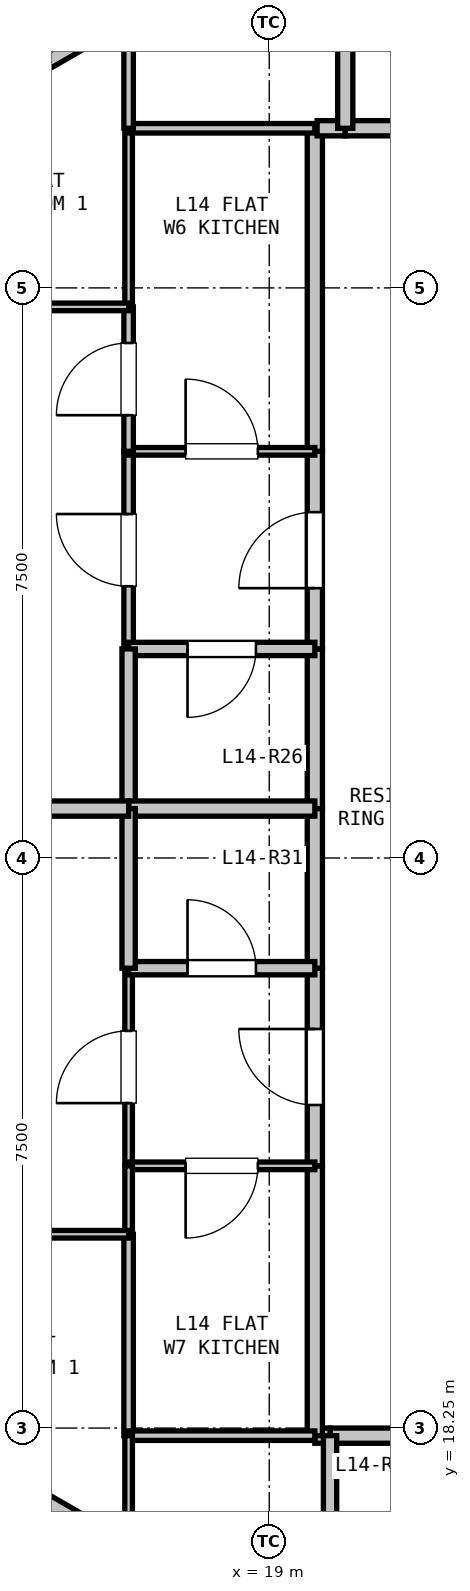
"""IFC4 building model, lengths in metres.
Left out: names, types, materials, properties, quantities, classifications, styles, units other than length and angle.
Written with IfcOpenShell. Run it as: python <this file> out.ifc"""

import sys

from ifc_helpers import new_model, si_unit, direction, frame, frame_2d, origin, place, context, subcontext, project, spatial, rectangle, extrude, element, fill, save


model = new_model("IFC4")
c1 = context("Model", 3, precision=1e-05, world=origin(), true_north=direction((0.0, 1.0)))
c2 = subcontext(c1, "Body", "Model", "MODEL_VIEW")
j1 = project(units=[si_unit("LENGTHUNIT", "METRE"), si_unit("PLANEANGLEUNIT", "RADIAN")], contexts=[c1])
p1 = place(None, origin())
s1 = spatial("IfcSite", under=j1, at=p1, CompositionType="ELEMENT")
p2 = place(p1, origin())
s2 = spatial("IfcBuilding", under=s1, at=p2, CompositionType="ELEMENT")
p3 = place(p2, frame((0.0, 0.0, 52.2)))
s3 = spatial("IfcBuildingStorey", under=s2, at=p3, CompositionType="ELEMENT", Elevation=52.2)
for number, where, z_axis, x_axis in (
    (1, (15.008, 35.611, 0.0), (0.0, 0.0, 1.0), (0.866, 0.5, 0.0)),
    (2, (16.48, 17.039, 0.0), (0.0, 0.0, 1.0), (-0.866, 0.5, 0.0)),
):
    element("IfcWall", number, at=place(p3, frame(where, z_axis=z_axis, x_axis=x_axis)), inside=s3, PredefinedType="PARAPET", context=c2, shape_type="SweptSolid", body=[
        extrude(rectangle(XDim=1.7, YDim=0.2, at=frame_2d((0.85, 0.0))), origin(), (0.0, 0.0, 1.0), 2.66),
    ])
p4 = place(p3, frame((21.8, 18.15, 0.0), z_axis=(0.0, 0.0, 1.0), x_axis=(-1.0, 0.0, 0.0)))
e3 = element("IfcWall", 3, at=p4, inside=s3, PredefinedType="PARTITIONING", context=c2, shape_type="SweptSolid", body=[
    extrude(rectangle(XDim=2.0, YDim=0.2, at=frame_2d((1.0, 0.0))), origin(), (0.0, 0.0, 1.0), 3.04),
])
p5 = place(p3, frame((19.8, 18.15, 0.0), z_axis=(0.0, 0.0, 1.0), x_axis=(-1.0, 0.0, 0.0)))
e4 = element("IfcWall", 4, at=p5, inside=s3, PredefinedType="PARTITIONING", context=c2, shape_type="SweptSolid", body=[
    extrude(rectangle(XDim=0.2, YDim=0.2, at=frame_2d((0.1, 0.0))), origin(), (0.0, 0.0, 1.0), 3.04),
])
p6 = place(p3, frame((19.6, 18.15, 0.0), z_axis=(0.0, 0.0, 1.0), x_axis=(0.0, 1.0, 0.0)))
e5 = element("IfcWall", 5, at=p6, inside=s3, PredefinedType="PARTITIONING", context=c2, shape_type="SweptSolid", body=[
    extrude(rectangle(XDim=3.55, YDim=0.2, at=frame_2d((1.775, 0.0))), origin(), (0.0, 0.0, 1.0), 2.338),
])
p7 = place(p3, frame((19.6, 21.7, 0.0), z_axis=(0.0, 0.0, 1.0), x_axis=(0.0, 1.0, 0.0)))
e6 = element("IfcWall", 6, at=p7, inside=s3, PredefinedType="PARTITIONING", context=c2, shape_type="SweptSolid", body=[
    extrude(rectangle(XDim=2.6, YDim=0.2, at=frame_2d((1.3, 0.0))), origin(), (0.0, 0.0, 1.0), 3.04),
])
p8 = place(p7, frame((0.8, 0.0, 0.0)))
e7 = element("IfcOpeningElement", 7, at=p8, cuts=e6, PredefinedType="OPENING", context=c2, shape_type="SweptSolid", body=[
    extrude(rectangle(XDim=1.0, YDim=2.15, at=frame_2d((0.5, 1.075))), frame((0.0, 0.11, 0.0), z_axis=(0.0, -1.0, 0.0), x_axis=(1.0, 0.0, 0.0)), (0.0, 0.0, 1.0), 0.22),
])
p9 = place(p3, frame((19.6, 24.3, 0.0), z_axis=(0.0, 0.0, 1.0), x_axis=(0.0, 1.0, 0.0)))
e8 = element("IfcWall", 8, at=p9, inside=s3, PredefinedType="PARTITIONING", context=c2, shape_type="SweptSolid", body=[
    extrude(rectangle(XDim=2.1, YDim=0.2, at=frame_2d((1.05, 0.0))), origin(), (0.0, 0.0, 1.0), 3.04),
])
p10 = place(p3, frame((19.6, 26.4, 0.0), z_axis=(0.0, 0.0, 1.0), x_axis=(0.0, 1.0, 0.0)))
e9 = element("IfcWall", 9, at=p10, inside=s3, PredefinedType="PARTITIONING", context=c2, shape_type="SweptSolid", body=[
    extrude(rectangle(XDim=2.1, YDim=0.2, at=frame_2d((1.05, 0.0))), origin(), (0.0, 0.0, 1.0), 3.04),
])
p11 = place(p3, frame((19.6, 28.5, 0.0), z_axis=(0.0, 0.0, 1.0), x_axis=(0.0, 1.0, 0.0)))
e10 = element("IfcWall", 10, at=p11, inside=s3, PredefinedType="PARTITIONING", context=c2, shape_type="SweptSolid", body=[
    extrude(rectangle(XDim=2.6, YDim=0.2, at=frame_2d((1.3, 0.0))), origin(), (0.0, 0.0, 1.0), 3.04),
])
p12 = place(p11, frame((0.8, 0.0, 0.0)))
e11 = element("IfcOpeningElement", 11, at=p12, cuts=e10, PredefinedType="OPENING", context=c2, shape_type="SweptSolid", body=[
    extrude(rectangle(XDim=1.0, YDim=2.15, at=frame_2d((0.5, 1.075))), frame((0.0, 0.11, 0.0), z_axis=(0.0, -1.0, 0.0), x_axis=(1.0, 0.0, 0.0)), (0.0, 0.0, 1.0), 0.22),
])
p13 = place(p3, frame((19.6, 31.1, 0.0), z_axis=(0.0, 0.0, 1.0), x_axis=(0.0, 1.0, 0.0)))
e12 = element("IfcWall", 12, at=p13, inside=s3, PredefinedType="PARTITIONING", context=c2, shape_type="SweptSolid", body=[
    extrude(rectangle(XDim=4.25, YDim=0.2, at=frame_2d((2.125, 0.0))), origin(), (0.0, 0.0, 1.0), 2.338),
])
p14 = place(p3, frame((19.63, 35.35, 0.0), z_axis=(0.0, 0.0, 1.0), x_axis=(1.0, 0.0, 0.0)))
e13 = element("IfcWall", 13, at=p14, inside=s3, PredefinedType="PARTITIONING", context=c2, shape_type="SweptSolid", body=[
    extrude(rectangle(XDim=0.37, YDim=0.2, at=frame_2d((0.185, 0.0))), origin(), (0.0, 0.0, 1.0), 3.04),
])
p15 = place(p3, frame((20.0, 35.35, 0.0), z_axis=(0.0, 0.0, 1.0), x_axis=(1.0, 0.0, 0.0)))
e14 = element("IfcWall", 14, at=p15, inside=s3, PredefinedType="PARTITIONING", context=c2, shape_type="SweptSolid", body=[
    extrude(rectangle(XDim=2.3, YDim=0.2, at=frame_2d((1.15, 0.0))), origin(), (0.0, 0.0, 1.0), 3.04),
])
p16 = place(p15, frame((0.725, 0.0, 0.0)))
e15 = element("IfcOpeningElement", 15, at=p16, cuts=e14, PredefinedType="OPENING", context=c2, shape_type="SweptSolid", body=[
    extrude(rectangle(XDim=0.85, YDim=2.1, at=frame_2d((0.425, 1.05))), frame((0.0, 0.11, 0.0), z_axis=(0.0, -1.0, 0.0), x_axis=(1.0, 0.0, 0.0)), (0.0, 0.0, 1.0), 0.22),
])
p17 = place(p3, frame((17.15, 28.5, 0.0), z_axis=(0.0, 0.0, 1.0), x_axis=(0.0, 1.0, 0.0)))
e16 = element("IfcWall", 16, at=p17, inside=s3, PredefinedType="PARTITIONING", context=c2, shape_type="SweptSolid", body=[
    extrude(rectangle(XDim=2.6, YDim=0.125, at=frame_2d((1.3, 0.0))), origin(), (0.0, 0.0, 1.0), 3.04),
])
p18 = place(p17, frame((0.825, 0.0, 0.0)))
e17 = element("IfcOpeningElement", 17, at=p18, cuts=e16, PredefinedType="OPENING", context=c2, shape_type="SweptSolid", body=[
    extrude(rectangle(XDim=0.95, YDim=2.1, at=frame_2d((0.475, 1.05))), frame((0.0, 0.073, 0.0), z_axis=(0.0, -1.0, 0.0), x_axis=(1.0, 0.0, 0.0)), (0.0, 0.0, 1.0), 0.145),
])
p19 = place(p3, frame((17.15, 31.1, 0.0), z_axis=(0.0, 0.0, 1.0), x_axis=(1.0, 0.0, 0.0)))
e18 = element("IfcWall", 18, at=p19, inside=s3, PredefinedType="PARTITIONING", context=c2, shape_type="SweptSolid", body=[
    extrude(rectangle(XDim=2.45, YDim=0.1, at=frame_2d((1.225, 0.0))), origin(), (0.0, 0.0, 1.0), 3.04),
])
p20 = place(p19, frame((0.75, 0.0, 0.0)))
e19 = element("IfcOpeningElement", 19, at=p20, cuts=e18, PredefinedType="OPENING", context=c2, shape_type="SweptSolid", body=[
    extrude(rectangle(XDim=0.95, YDim=2.1, at=frame_2d((0.475, 1.05))), frame((0.0, 0.06, 0.0), z_axis=(0.0, -1.0, 0.0), x_axis=(1.0, 0.0, 0.0)), (0.0, 0.0, 1.0), 0.12),
])
p21 = place(p3, frame((19.6, 28.5, 0.0), z_axis=(0.0, 0.0, 1.0), x_axis=(-1.0, 0.0, 0.0)))
e20 = element("IfcWall", 20, at=p21, inside=s3, PredefinedType="PLUMBINGWALL", context=c2, shape_type="SweptSolid", body=[
    extrude(rectangle(XDim=2.45, YDim=0.175, at=frame_2d((1.225, 0.0))), origin(), (0.0, 0.0, 1.0), 3.04),
])
p22 = place(p21, frame((0.775, 0.0, 0.0)))
e21 = element("IfcOpeningElement", 21, at=p22, cuts=e20, PredefinedType="OPENING", context=c2, shape_type="SweptSolid", body=[
    extrude(rectangle(XDim=0.9, YDim=2.1, at=frame_2d((0.45, 1.05))), frame((0.0, 0.097, 0.0), z_axis=(0.0, -1.0, 0.0), x_axis=(1.0, 0.0, 0.0)), (0.0, 0.0, 1.0), 0.195),
])
p23 = place(p3, frame((17.15, 21.7, 0.0), z_axis=(0.0, 0.0, 1.0), x_axis=(0.0, 1.0, 0.0)))
e22 = element("IfcWall", 22, at=p23, inside=s3, PredefinedType="PARTITIONING", context=c2, shape_type="SweptSolid", body=[
    extrude(rectangle(XDim=2.6, YDim=0.1, at=frame_2d((1.3, 0.0))), origin(), (0.0, 0.0, 1.0), 3.04),
])
p24 = place(p23, frame((0.825, 0.0, 0.0)))
e23 = element("IfcOpeningElement", 23, at=p24, cuts=e22, PredefinedType="OPENING", context=c2, shape_type="SweptSolid", body=[
    extrude(rectangle(XDim=0.95, YDim=2.1, at=frame_2d((0.475, 1.05))), frame((0.0, 0.06, 0.0), z_axis=(0.0, -1.0, 0.0), x_axis=(1.0, 0.0, 0.0)), (0.0, 0.0, 1.0), 0.12),
])
p25 = place(p3, frame((17.15, 24.3, 0.0), z_axis=(0.0, 0.0, 1.0), x_axis=(1.0, 0.0, 0.0)))
e24 = element("IfcWall", 24, at=p25, inside=s3, PredefinedType="PLUMBINGWALL", context=c2, shape_type="SweptSolid", body=[
    extrude(rectangle(XDim=2.45, YDim=0.175, at=frame_2d((1.225, 0.0))), origin(), (0.0, 0.0, 1.0), 3.04),
])
p26 = place(p25, frame((0.775, 0.0, 0.0)))
e25 = element("IfcOpeningElement", 25, at=p26, cuts=e24, PredefinedType="OPENING", context=c2, shape_type="SweptSolid", body=[
    extrude(rectangle(XDim=0.9, YDim=2.1, at=frame_2d((0.45, 1.05))), frame((0.0, 0.097, 0.0), z_axis=(0.0, -1.0, 0.0), x_axis=(1.0, 0.0, 0.0)), (0.0, 0.0, 1.0), 0.195),
])
p27 = place(p3, frame((19.6, 21.7, 0.0), z_axis=(0.0, 0.0, 1.0), x_axis=(-1.0, 0.0, 0.0)))
e26 = element("IfcWall", 26, at=p27, inside=s3, PredefinedType="PARTITIONING", context=c2, shape_type="SweptSolid", body=[
    extrude(rectangle(XDim=2.45, YDim=0.1, at=frame_2d((1.225, 0.0))), origin(), (0.0, 0.0, 1.0), 2.338),
])
p28 = place(p27, frame((0.75, 0.0, 0.0)))
e27 = element("IfcOpeningElement", 27, at=p28, cuts=e26, PredefinedType="OPENING", context=c2, shape_type="SweptSolid", body=[
    extrude(rectangle(XDim=0.95, YDim=2.1, at=frame_2d((0.475, 1.05))), frame((0.0, 0.06, 0.0), z_axis=(0.0, -1.0, 0.0), x_axis=(1.0, 0.0, 0.0)), (0.0, 0.0, 1.0), 0.12),
])
p29 = place(p3, frame((19.8, 14.956, 0.0), z_axis=(0.0, 0.0, 1.0), x_axis=(0.0, 1.0, 0.0)))
e28 = element("IfcWall", 28, at=p29, inside=s3, PredefinedType="PLUMBINGWALL", context=c2, shape_type="SweptSolid", body=[
    extrude(rectangle(XDim=3.194, YDim=0.175, at=frame_2d((1.597, 0.0))), origin(), (0.0, 0.0, 1.0), 2.365),
])
p30 = place(p3, frame((17.15, 26.4, 0.0), z_axis=(0.0, 0.0, 1.0), x_axis=(0.0, 1.0, 0.0)))
e29 = element("IfcWall", 29, at=p30, inside=s3, PredefinedType="PLUMBINGWALL", context=c2, shape_type="SweptSolid", body=[
    extrude(rectangle(XDim=2.1, YDim=0.175, at=frame_2d((1.05, 0.0))), origin(), (0.0, 0.0, 1.0), 3.04),
])
p31 = place(p3, frame((19.6, 26.4, 0.0), z_axis=(0.0, 0.0, 1.0), x_axis=(-1.0, 0.0, 0.0)))
e30 = element("IfcWall", 30, at=p31, inside=s3, PredefinedType="PARTITIONING", context=c2, shape_type="SweptSolid", body=[
    extrude(rectangle(XDim=2.45, YDim=0.2, at=frame_2d((1.225, 0.0))), origin(), (0.0, 0.0, 1.0), 3.04),
])
p32 = place(p3, frame((17.15, 31.1, 0.0), z_axis=(0.0, 0.0, 1.0), x_axis=(0.0, 1.0, 0.0)))
e31 = element("IfcWall", 31, at=p32, inside=s3, PredefinedType="PARTITIONING", context=c2, shape_type="SweptSolid", body=[
    extrude(rectangle(XDim=1.9, YDim=0.125, at=frame_2d((0.95, 0.0))), origin(), (0.0, 0.0, 1.0), 2.338),
])
p33 = place(p32, frame((0.475, 0.0, 0.0)))
e32 = element("IfcOpeningElement", 32, at=p33, cuts=e31, PredefinedType="OPENING", context=c2, shape_type="SweptSolid", body=[
    extrude(rectangle(XDim=0.95, YDim=2.1, at=frame_2d((0.475, 1.05))), frame((0.0, 0.073, 0.0), z_axis=(0.0, -1.0, 0.0), x_axis=(1.0, 0.0, 0.0)), (0.0, 0.0, 1.0), 0.145),
])
p34 = place(p3, frame((17.15, 33.0, 0.0), z_axis=(0.0, 0.0, 1.0), x_axis=(0.0, 1.0, 0.0)))
e33 = element("IfcWall", 33, at=p34, inside=s3, PredefinedType="PARTITIONING", context=c2, shape_type="SweptSolid", body=[
    extrude(rectangle(XDim=2.35, YDim=0.1, at=frame_2d((1.175, 0.0))), origin(), (0.0, 0.0, 1.0), 3.04),
])
p35 = place(p3, frame((17.15, 35.35, 0.0), z_axis=(0.0, 0.0, 1.0), x_axis=(1.0, 0.0, 0.0)))
e34 = element("IfcWall", 34, at=p35, inside=s3, PredefinedType="PARTITIONING", context=c2, shape_type="SweptSolid", body=[
    extrude(rectangle(XDim=2.45, YDim=0.125, at=frame_2d((1.225, 0.0))), origin(), (0.0, 0.0, 1.0), 3.04),
])
p36 = place(p3, frame((17.15, 24.3, 0.0), z_axis=(0.0, 0.0, 1.0), x_axis=(0.0, 1.0, 0.0)))
e35 = element("IfcWall", 35, at=p36, inside=s3, PredefinedType="PLUMBINGWALL", context=c2, shape_type="SweptSolid", body=[
    extrude(rectangle(XDim=2.1, YDim=0.175, at=frame_2d((1.05, 0.0))), origin(), (0.0, 0.0, 1.0), 3.04),
])
p37 = place(p3, frame((17.15, 18.15, 0.0), z_axis=(0.0, 0.0, 1.0), x_axis=(0.0, 1.0, 0.0)))
e36 = element("IfcWall", 36, at=p37, inside=s3, PredefinedType="PARTITIONING", context=c2, shape_type="SweptSolid", body=[
    extrude(rectangle(XDim=2.65, YDim=0.125, at=frame_2d((1.325, 0.0))), origin(), (0.0, 0.0, 1.0), 3.04),
])
p38 = place(p3, frame((17.15, 20.8, 0.0), z_axis=(0.0, 0.0, 1.0), x_axis=(0.0, 1.0, 0.0)))
e37 = element("IfcWall", 37, at=p38, inside=s3, PredefinedType="PARTITIONING", context=c2, shape_type="SweptSolid", body=[
    extrude(rectangle(XDim=0.9, YDim=0.1, at=frame_2d((0.45, 0.0))), origin(), (0.0, 0.0, 1.0), 2.338),
])
p39 = place(p3, frame((19.6, 18.15, 0.0), z_axis=(0.0, 0.0, 1.0), x_axis=(-1.0, 0.0, 0.0)))
e38 = element("IfcWall", 38, at=p39, inside=s3, PredefinedType="PARTITIONING", context=c2, shape_type="SweptSolid", body=[
    extrude(rectangle(XDim=2.45, YDim=0.125, at=frame_2d((1.225, 0.0))), origin(), (0.0, 0.0, 1.0), 3.04),
])
p40 = place(p3, frame((20.0, 35.35, 0.0), z_axis=(0.0, 0.0, 1.0), x_axis=(0.0, 1.0, 0.0)))
e39 = element("IfcWall", 39, at=p40, inside=s3, PredefinedType="PARTITIONING", context=c2, shape_type="SweptSolid", body=[
    extrude(rectangle(XDim=3.31, YDim=0.2, at=frame_2d((1.655, 0.0))), origin(), (0.0, 0.0, 1.0), 2.365),
])
p41 = place(p3, frame((10.419, 33.0, 0.0), z_axis=(0.0, 0.0, 1.0), x_axis=(1.0, 0.0, 0.0)))
e40 = element("IfcWall", 40, at=p41, inside=s3, PredefinedType="PARTITIONING", context=c2, shape_type="SweptSolid", body=[
    extrude(rectangle(XDim=6.731, YDim=0.1, at=frame_2d((3.365, 0.0))), origin(), (0.0, 0.0, 1.0), 2.365),
])
p42 = place(p41, frame((2.89, 0.0, 0.0)))
e41 = element("IfcOpeningElement", 41, at=p42, cuts=e40, PredefinedType="OPENING", context=c2, shape_type="SweptSolid", body=[
    extrude(rectangle(XDim=0.95, YDim=2.1, at=frame_2d((0.475, 1.05))), frame((0.0, 0.06, 0.0), z_axis=(0.0, -1.0, 0.0), x_axis=(1.0, 0.0, 0.0)), (0.0, 0.0, 1.0), 0.12),
])
p43 = place(p3, frame((17.15, 26.4, 0.0), z_axis=(0.0, 0.0, 1.0), x_axis=(-1.0, 0.0, 0.0)))
e42 = element("IfcWall", 42, at=p43, inside=s3, PredefinedType="PARTITIONING", context=c2, shape_type="SweptSolid", body=[
    extrude(rectangle(XDim=13.175, YDim=0.2, at=frame_2d((6.588, 0.0))), origin(), (0.0, 0.0, 1.0), 2.65),
])
p44 = place(p3, frame((17.15, 37.014, 0.0), z_axis=(0.0, 0.0, 1.0), x_axis=(0.0, -1.0, 0.0)))
e43 = element("IfcWall", 43, at=p44, inside=s3, PredefinedType="PARTITIONING", context=c2, shape_type="SweptSolid", body=[
    extrude(rectangle(XDim=1.664, YDim=0.125, at=frame_2d((0.832, 0.0))), origin(), (0.0, 0.0, 1.0), 2.365),
])
p45 = place(p3, frame((17.15, 20.8, 0.0), z_axis=(0.0, 0.0, 1.0), x_axis=(-1.0, 0.0, 0.0)))
e44 = element("IfcWall", 44, at=p45, inside=s3, PredefinedType="PARTITIONING", context=c2, shape_type="SweptSolid", body=[
    extrude(rectangle(XDim=7.25, YDim=0.1, at=frame_2d((3.625, 0.0))), origin(), (0.0, 0.0, 1.0), 2.365),
])
p46 = place(p45, frame((3.15, 0.0, 0.0)))
e45 = element("IfcOpeningElement", 45, at=p46, cuts=e44, PredefinedType="OPENING", context=c2, shape_type="SweptSolid", body=[
    extrude(rectangle(XDim=0.95, YDim=2.1, at=frame_2d((0.475, 1.05))), frame((0.0, 0.06, 0.0), z_axis=(0.0, -1.0, 0.0), x_axis=(1.0, 0.0, 0.0)), (0.0, 0.0, 1.0), 0.12),
])
p47 = place(p3, frame((17.15, 18.15, 0.0), z_axis=(0.0, 0.0, 1.0), x_axis=(0.0, -1.0, 0.0)))
e46 = element("IfcWall", 46, at=p47, inside=s3, PredefinedType="PARTITIONING", context=c2, shape_type="SweptSolid", body=[
    extrude(rectangle(XDim=1.664, YDim=0.1, at=frame_2d((0.832, 0.0))), origin(), (0.0, 0.0, 1.0), 2.365),
])
p48 = place(p12, origin())
e47 = element("IfcDoor", 47, at=p48, inside=s3, OperationType="SINGLE_SWING_LEFT", PredefinedType="DOOR", context=c2, shape_type="SweptSolid", body=[
    extrude(rectangle(XDim=1.0, YDim=2.15, at=frame_2d((0.5, 1.075))), frame((0.0, 0.025, 0.0), z_axis=(0.0, -1.0, 0.0), x_axis=(1.0, 0.0, 0.0)), (0.0, 0.0, 1.0), 0.05),
])
fill(e11, e47)
p49 = place(p8, origin())
e48 = element("IfcDoor", 48, at=p49, inside=s3, OperationType="SINGLE_SWING_RIGHT", PredefinedType="DOOR", context=c2, shape_type="SweptSolid", body=[
    extrude(rectangle(XDim=1.0, YDim=2.15, at=frame_2d((0.5, 1.075))), frame((0.0, 0.025, 0.0), z_axis=(0.0, -1.0, 0.0), x_axis=(1.0, 0.0, 0.0)), (0.0, 0.0, 1.0), 0.05),
])
fill(e7, e48)
p50 = place(p22, origin())
e49 = element("IfcDoor", 49, at=p50, inside=s3, OperationType="SINGLE_SWING_RIGHT", PredefinedType="DOOR", context=c2, shape_type="SweptSolid", body=[
    extrude(rectangle(XDim=0.9, YDim=2.1, at=frame_2d((0.45, 1.05))), frame((0.0, 0.025, 0.0), z_axis=(0.0, -1.0, 0.0), x_axis=(1.0, 0.0, 0.0)), (0.0, 0.0, 1.0), 0.05),
])
fill(e21, e49)
p51 = place(p20, origin())
e50 = element("IfcDoor", 50, at=p51, inside=s3, OperationType="SINGLE_SWING_LEFT", PredefinedType="DOOR", context=c2, shape_type="SweptSolid", body=[
    extrude(rectangle(XDim=0.95, YDim=2.1, at=frame_2d((0.475, 1.05))), frame((0.0, 0.025, 0.0), z_axis=(0.0, -1.0, 0.0), x_axis=(1.0, 0.0, 0.0)), (0.0, 0.0, 1.0), 0.05),
])
fill(e19, e50)
p52 = place(p18, origin())
e51 = element("IfcDoor", 51, at=p52, inside=s3, OperationType="SINGLE_SWING_RIGHT", PredefinedType="DOOR", context=c2, shape_type="SweptSolid", body=[
    extrude(rectangle(XDim=0.95, YDim=2.1, at=frame_2d((0.475, 1.05))), frame((0.0, 0.025, 0.0), z_axis=(0.0, -1.0, 0.0), x_axis=(1.0, 0.0, 0.0)), (0.0, 0.0, 1.0), 0.05),
])
fill(e17, e51)
p53 = place(p26, origin())
e52 = element("IfcDoor", 52, at=p53, inside=s3, OperationType="SINGLE_SWING_LEFT", PredefinedType="DOOR", context=c2, shape_type="SweptSolid", body=[
    extrude(rectangle(XDim=0.9, YDim=2.1, at=frame_2d((0.45, 1.05))), frame((0.0, 0.025, 0.0), z_axis=(0.0, -1.0, 0.0), x_axis=(1.0, 0.0, 0.0)), (0.0, 0.0, 1.0), 0.05),
])
fill(e25, e52)
p54 = place(p28, origin())
e53 = element("IfcDoor", 53, at=p54, inside=s3, OperationType="SINGLE_SWING_RIGHT", PredefinedType="DOOR", context=c2, shape_type="SweptSolid", body=[
    extrude(rectangle(XDim=0.95, YDim=2.1, at=frame_2d((0.475, 1.05))), frame((0.0, 0.025, 0.0), z_axis=(0.0, -1.0, 0.0), x_axis=(1.0, 0.0, 0.0)), (0.0, 0.0, 1.0), 0.05),
])
fill(e27, e53)
p55 = place(p24, origin())
e54 = element("IfcDoor", 54, at=p55, inside=s3, OperationType="SINGLE_SWING_LEFT", PredefinedType="DOOR", context=c2, shape_type="SweptSolid", body=[
    extrude(rectangle(XDim=0.95, YDim=2.1, at=frame_2d((0.475, 1.05))), frame((0.0, 0.025, 0.0), z_axis=(0.0, -1.0, 0.0), x_axis=(1.0, 0.0, 0.0)), (0.0, 0.0, 1.0), 0.05),
])
fill(e23, e54)
p56 = place(p33, origin())
e55 = element("IfcDoor", 55, at=p56, inside=s3, OperationType="SINGLE_SWING_LEFT", PredefinedType="DOOR", context=c2, shape_type="SweptSolid", body=[
    extrude(rectangle(XDim=0.95, YDim=2.1, at=frame_2d((0.475, 1.05))), frame((0.0, 0.025, 0.0), z_axis=(0.0, -1.0, 0.0), x_axis=(1.0, 0.0, 0.0)), (0.0, 0.0, 1.0), 0.05),
])
fill(e32, e55)
save(model, sys.argv[1])
